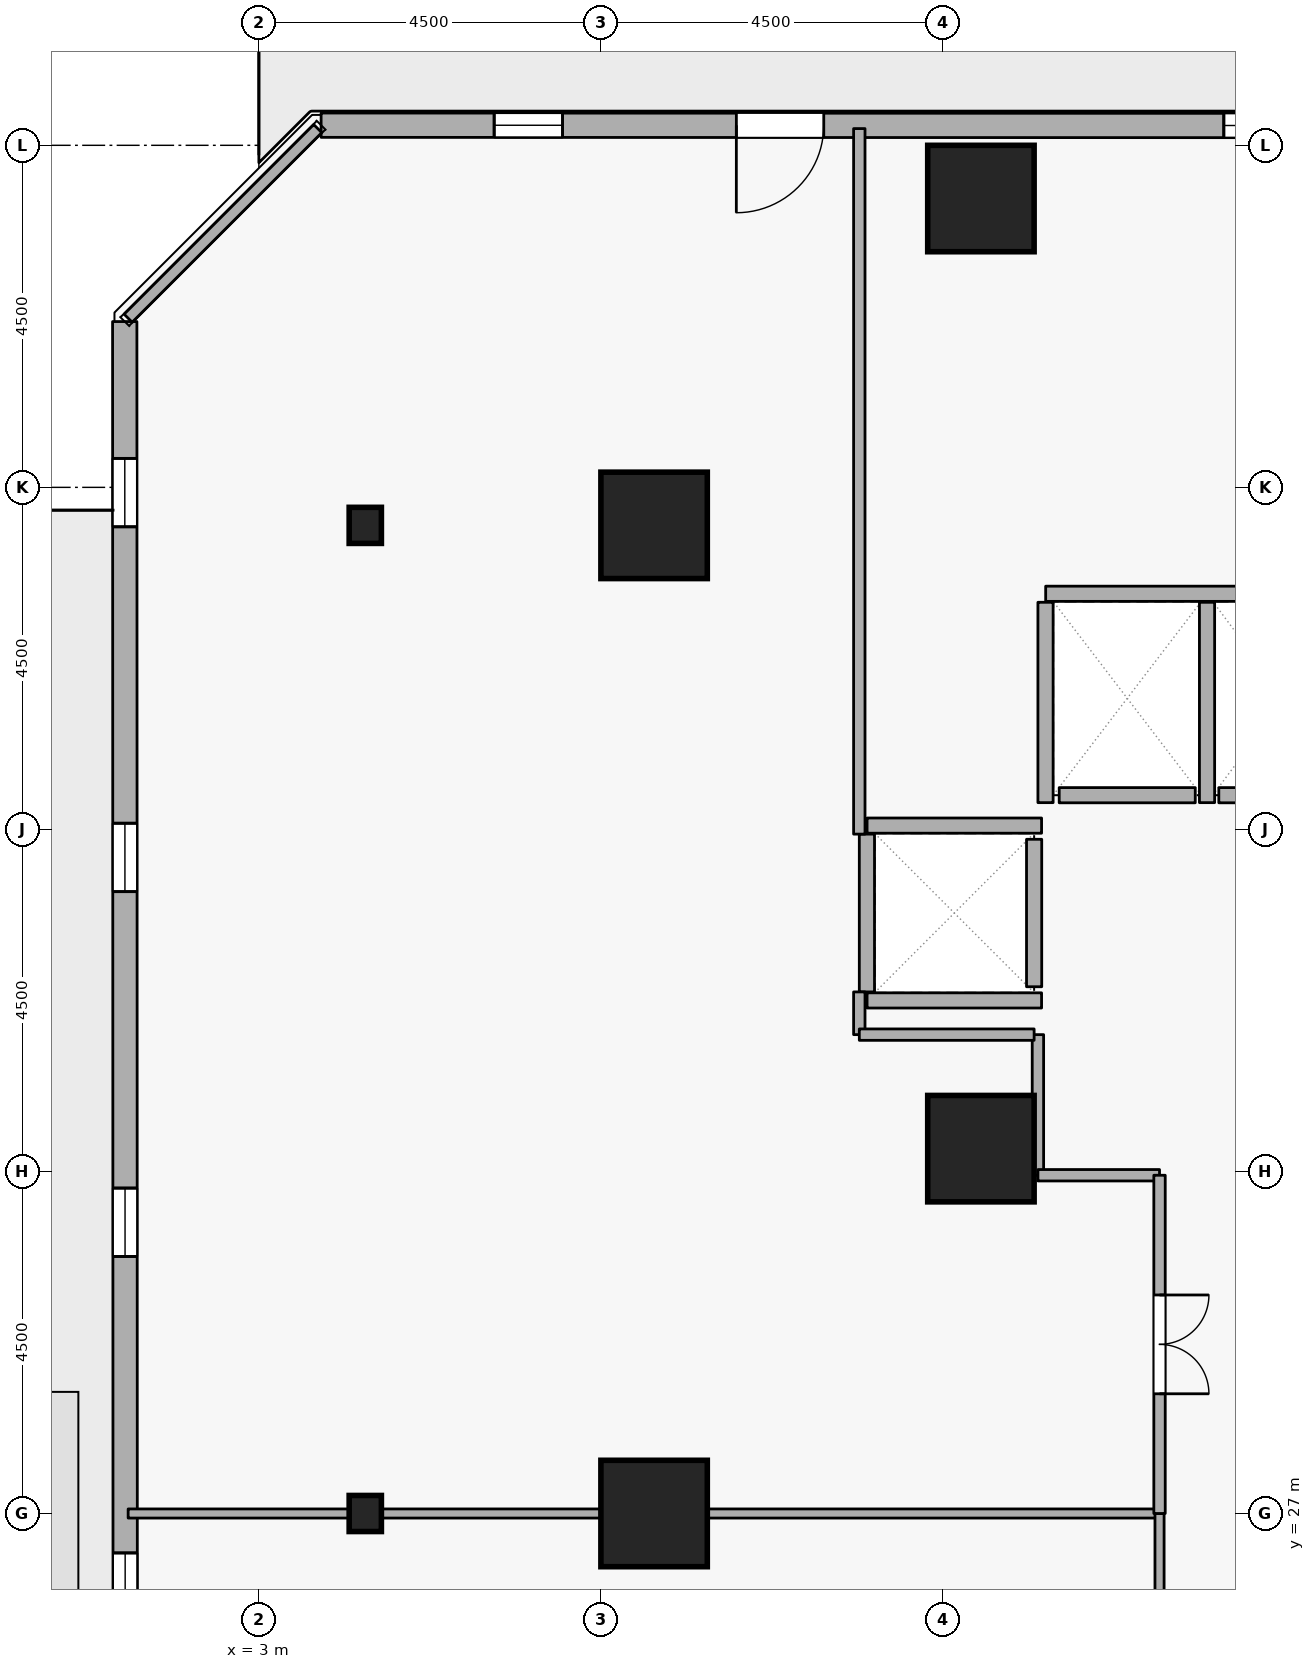
"""IFC4 building model, lengths in metres.
Left out: names, types, materials, properties, quantities, classifications, styles, units other than length and angle.
Written with IfcOpenShell. Run it as: python <this file> out.ifc"""

import sys

from ifc_helpers import new_model, si_unit, direction, frame, frame_2d, origin, origin_2d, place, context, subcontext, project, spatial, rectangle, i_section, extrude, element, fill, save


model = new_model("IFC4")
c1 = context("Model", 3, precision=1e-05, world=origin(), true_north=direction((0.0, 1.0)))
c2 = subcontext(c1, "Body", "Model", "MODEL_VIEW")
j1 = project(units=[si_unit("LENGTHUNIT", "METRE"), si_unit("PLANEANGLEUNIT", "RADIAN")], contexts=[c1])
p1 = place(None, origin())
s1 = spatial("IfcSite", under=j1, at=p1, CompositionType="ELEMENT")
p2 = place(p1, origin())
s2 = spatial("IfcBuilding", under=s1, at=p2, CompositionType="ELEMENT")
p3 = place(p2, frame((0.0, 0.0, 27.9)))
s3 = spatial("IfcBuildingStorey", under=s2, at=p3, CompositionType="ELEMENT", Elevation=27.9)
for number, where, z_axis, x_axis in (
    (1, (12.5, 44.3, 0.0), (0.0, 0.0, 1.0), (1.0, 0.0, 0.0)),
    (2, (8.2, 27.0, 0.0), (0.0, 0.0, 1.0), (1.0, 0.0, 0.0)),
    (3, (8.2, 40.0, 0.0), (0.0, 0.0, 1.0), (1.0, 0.0, 0.0)),
    (4, (12.5, 31.8, 0.0), (0.0, 0.0, 1.0), (1.0, 0.0, 0.0)),
):
    element("IfcColumn", number, at=place(p3, frame(where, z_axis=z_axis, x_axis=x_axis)), inside=s3, PredefinedType="COLUMN", context=c2, shape_type="SweptSolid", body=[
        extrude(rectangle(XDim=1.4, YDim=1.4, at=origin_2d()), origin(), (0.0, 0.0, 1.0), 3.6),
    ])
for number, where, z_axis, x_axis in (
    (5, (4.4, 27.0, 0.0), (0.0, 0.0, 1.0), (1.0, 0.0, 0.0)),
    (6, (4.4, 40.0, 0.0), (0.0, 0.0, 1.0), (1.0, 0.0, 0.0)),
):
    element("IfcColumn", number, at=place(p3, frame(where, z_axis=z_axis, x_axis=x_axis)), inside=s3, PredefinedType="COLUMN", context=c2, shape_type="SweptSolid", body=[
        extrude(i_section(OverallWidth=0.424, OverallDepth=0.475, WebThickness=0.048, FlangeThickness=0.077, FilletRadius=0.015, at=origin_2d()), origin(), (0.0, 0.0, 1.0), 3.6),
    ])
p4 = place(p3, frame((37.596, 45.253, 0.0), z_axis=(0.0, 0.0, 1.0), x_axis=(-0.999999942296, 0.000339718087, 0.0)))
e7 = element("IfcWall", 7, at=p4, inside=s3, PredefinedType="STANDARD", context=c2, shape_type="SweptSolid", body=[
    extrude(rectangle(XDim=33.777, YDim=0.32, at=frame_2d((16.888, 0.0))), origin(), (0.0, 0.0, 1.0), 2.7),
])
p5 = place(p4, frame((27.164, 0.0, 0.0)))
e8 = element("IfcOpeningElement", 8, at=p5, cuts=e7, PredefinedType="OPENING", context=c2, shape_type="SweptSolid", body=[
    extrude(rectangle(XDim=1.15, YDim=2.1, at=frame_2d((0.575, 1.05))), frame((0.0, 0.17, 0.0), z_axis=(0.0, -1.0, 0.0), x_axis=(1.0, 0.0, 0.0)), (0.0, 0.0, 1.0), 0.34),
])
p6 = place(p4, frame((6.6, 0.0, 0.72)))
e9 = element("IfcOpeningElement", 9, at=p6, cuts=e7, PredefinedType="OPENING", context=c2, shape_type="SweptSolid", body=[
    extrude(rectangle(XDim=0.9, YDim=1.75, at=frame_2d((0.45, 0.875))), frame((0.0, 0.17, 0.0), z_axis=(0.0, -1.0, 0.0), x_axis=(1.0, 0.0, 0.0)), (0.0, 0.0, 1.0), 0.34),
])
p7 = place(p4, frame((16.2, 0.0, 0.72)))
e10 = element("IfcOpeningElement", 10, at=p7, cuts=e7, PredefinedType="OPENING", context=c2, shape_type="SweptSolid", body=[
    extrude(rectangle(XDim=0.9, YDim=1.75, at=frame_2d((0.45, 0.875))), frame((0.0, 0.17, 0.0), z_axis=(0.0, -1.0, 0.0), x_axis=(1.0, 0.0, 0.0)), (0.0, 0.0, 1.0), 0.34),
])
p8 = place(p4, frame((21.0, 0.0, 0.72)))
e11 = element("IfcOpeningElement", 11, at=p8, cuts=e7, PredefinedType="OPENING", context=c2, shape_type="SweptSolid", body=[
    extrude(rectangle(XDim=0.9, YDim=1.75, at=frame_2d((0.45, 0.875))), frame((0.0, 0.17, 0.0), z_axis=(0.0, -1.0, 0.0), x_axis=(1.0, 0.0, 0.0)), (0.0, 0.0, 1.0), 0.34),
])
p9 = place(p4, frame((30.6, 0.0, 0.72)))
e12 = element("IfcOpeningElement", 12, at=p9, cuts=e7, PredefinedType="OPENING", context=c2, shape_type="SweptSolid", body=[
    extrude(rectangle(XDim=0.9, YDim=1.75, at=frame_2d((0.45, 0.875))), frame((0.0, 0.17, 0.0), z_axis=(0.0, -1.0, 0.0), x_axis=(1.0, 0.0, 0.0)), (0.0, 0.0, 1.0), 0.34),
])
p10 = place(p3, frame((1.235, 42.681, 0.0), z_axis=(0.0, 0.0, 1.0), x_axis=(0.000339718087, -0.999999942296, 0.0)))
e13 = element("IfcWall", 13, at=p10, inside=s3, PredefinedType="STANDARD", context=c2, shape_type="SweptSolid", body=[
    extrude(rectangle(XDim=33.777, YDim=0.32, at=frame_2d((16.888, 0.0))), origin(), (0.0, 0.0, 1.0), 2.7),
])
p11 = place(p10, frame((18.688, 0.0, 0.0)))
e14 = element("IfcOpeningElement", 14, at=p11, cuts=e13, PredefinedType="OPENING", context=c2, shape_type="SweptSolid", body=[
    extrude(rectangle(XDim=1.0, YDim=2.08, at=frame_2d((0.5, 1.04))), frame((0.0, 0.17, 0.0), z_axis=(0.0, -1.0, 0.0), x_axis=(1.0, 0.0, 0.0)), (0.0, 0.0, 1.0), 0.34),
])
p12 = place(p10, frame((1.8, 0.0, 0.72)))
e15 = element("IfcOpeningElement", 15, at=p12, cuts=e13, PredefinedType="OPENING", context=c2, shape_type="SweptSolid", body=[
    extrude(rectangle(XDim=0.9, YDim=1.75, at=frame_2d((0.45, 0.875))), frame((0.0, 0.17, 0.0), z_axis=(0.0, -1.0, 0.0), x_axis=(1.0, 0.0, 0.0)), (0.0, 0.0, 1.0), 0.34),
])
p13 = place(p10, frame((6.6, 0.0, 0.72)))
e16 = element("IfcOpeningElement", 16, at=p13, cuts=e13, PredefinedType="OPENING", context=c2, shape_type="SweptSolid", body=[
    extrude(rectangle(XDim=0.9, YDim=1.75, at=frame_2d((0.45, 0.875))), frame((0.0, 0.17, 0.0), z_axis=(0.0, -1.0, 0.0), x_axis=(1.0, 0.0, 0.0)), (0.0, 0.0, 1.0), 0.34),
])
p14 = place(p10, frame((11.4, 0.0, 0.72)))
e17 = element("IfcOpeningElement", 17, at=p14, cuts=e13, PredefinedType="OPENING", context=c2, shape_type="SweptSolid", body=[
    extrude(rectangle(XDim=0.9, YDim=1.75, at=frame_2d((0.45, 0.875))), frame((0.0, 0.17, 0.0), z_axis=(0.0, -1.0, 0.0), x_axis=(1.0, 0.0, 0.0)), (0.0, 0.0, 1.0), 0.34),
])
p15 = place(p10, frame((16.2, 0.0, 0.72)))
e18 = element("IfcOpeningElement", 18, at=p15, cuts=e13, PredefinedType="OPENING", context=c2, shape_type="SweptSolid", body=[
    extrude(rectangle(XDim=0.9, YDim=1.75, at=frame_2d((0.45, 0.875))), frame((0.0, 0.17, 0.0), z_axis=(0.0, -1.0, 0.0), x_axis=(1.0, 0.0, 0.0)), (0.0, 0.0, 1.0), 0.34),
])
p16 = place(p10, frame((21.0, 0.0, 0.72)))
e19 = element("IfcOpeningElement", 19, at=p16, cuts=e13, PredefinedType="OPENING", context=c2, shape_type="SweptSolid", body=[
    extrude(rectangle(XDim=0.9, YDim=1.75, at=frame_2d((0.45, 0.875))), frame((0.0, 0.17, 0.0), z_axis=(0.0, -1.0, 0.0), x_axis=(1.0, 0.0, 0.0)), (0.0, 0.0, 1.0), 0.34),
])
p17 = place(p10, frame((25.8, 0.0, 0.72)))
e20 = element("IfcOpeningElement", 20, at=p17, cuts=e13, PredefinedType="OPENING", context=c2, shape_type="SweptSolid", body=[
    extrude(rectangle(XDim=0.9, YDim=1.75, at=frame_2d((0.45, 0.875))), frame((0.0, 0.17, 0.0), z_axis=(0.0, -1.0, 0.0), x_axis=(1.0, 0.0, 0.0)), (0.0, 0.0, 1.0), 0.34),
])
p18 = place(p3, frame((17.37, 36.45, 0.0), z_axis=(0.0, 0.0, 1.0), x_axis=(-1.0, 0.0, 0.0)))
e21 = element("IfcWall", 21, at=p18, inside=s3, PredefinedType="STANDARD", context=c2, shape_type="SweptSolid", body=[
    extrude(rectangle(XDim=1.74, YDim=0.2, at=frame_2d((0.87, 0.0))), origin(), (0.0, 0.0, 1.0), 3.34),
])
p19 = place(p3, frame((15.32, 36.45, 0.0), z_axis=(0.0, 0.0, 1.0), x_axis=(-1.0, 0.0, 0.0)))
e22 = element("IfcWall", 22, at=p19, inside=s3, PredefinedType="STANDARD", context=c2, shape_type="SweptSolid", body=[
    extrude(rectangle(XDim=1.79, YDim=0.2, at=frame_2d((0.895, 0.0))), origin(), (0.0, 0.0, 1.0), 3.34),
])
p20 = place(p3, frame((13.2, 33.93, 0.0), z_axis=(0.0, 0.0, 1.0), x_axis=(0.0, 1.0, 0.0)))
e23 = element("IfcWall", 23, at=p20, inside=s3, PredefinedType="STANDARD", context=c2, shape_type="SweptSolid", body=[
    extrude(rectangle(XDim=1.94, YDim=0.2, at=frame_2d((0.97, 0.0))), origin(), (0.0, 0.0, 1.0), 3.34),
])
p21 = place(p3, frame((13.352, 39.1, 0.0), z_axis=(0.0, 0.0, 1.0), x_axis=(1.0, 0.0, 0.0)))
e24 = element("IfcWall", 24, at=p21, inside=s3, PredefinedType="STANDARD", context=c2, shape_type="SweptSolid", body=[
    extrude(rectangle(XDim=4.196, YDim=0.2, at=frame_2d((2.098, 0.0))), origin(), (0.0, 0.0, 1.0), 3.34),
])
for number, where, z_axis, x_axis in (
    (25, (15.475, 36.352, 0.0), (0.0, 0.0, 1.0), (0.0, 1.0, 0.0)),
    (26, (13.35, 36.352, 0.0), (0.0, 0.0, 1.0), (0.0, 1.0, 0.0)),
):
    element("IfcWall", number, at=place(p3, frame(where, z_axis=z_axis, x_axis=x_axis)), inside=s3, PredefinedType="STANDARD", context=c2, shape_type="SweptSolid", body=[
        extrude(rectangle(XDim=2.636, YDim=0.2, at=frame_2d((1.318, 0.0))), origin(), (0.0, 0.0, 1.0), 3.34),
    ])
for number, where, z_axis, x_axis in (
    (27, (11.002, 36.05, 0.0), (0.0, 0.0, 1.0), (1.0, 0.0, 0.0)),
    (28, (11.002, 33.75, 0.0), (0.0, 0.0, 1.0), (1.0, 0.0, 0.0)),
):
    element("IfcWall", number, at=place(p3, frame(where, z_axis=z_axis, x_axis=x_axis)), inside=s3, PredefinedType="STANDARD", context=c2, shape_type="SweptSolid", body=[
        extrude(rectangle(XDim=2.296, YDim=0.2, at=frame_2d((1.148, 0.0))), origin(), (0.0, 0.0, 1.0), 3.34),
    ])
p22 = place(p3, frame((11.0, 33.862, 0.0), z_axis=(0.0, 0.0, 1.0), x_axis=(0.0, 1.0, 0.0)))
e29 = element("IfcWall", 29, at=p22, inside=s3, PredefinedType="STANDARD", context=c2, shape_type="SweptSolid", body=[
    extrude(rectangle(XDim=2.076, YDim=0.2, at=frame_2d((1.038, 0.0))), origin(), (0.0, 0.0, 1.0), 3.34),
])
p23 = place(p3, frame((1.28, 27.0, 0.0), z_axis=(0.0, 0.0, 1.0), x_axis=(1.0, 0.0, 0.0)))
e30 = element("IfcWall", 30, at=p23, inside=s3, PredefinedType="PARTITIONING", context=c2, shape_type="SweptSolid", body=[
    extrude(rectangle(XDim=13.57, YDim=0.12, at=frame_2d((6.785, 0.0))), origin(), (0.0, 0.0, 1.0), 2.878),
])
p24 = place(p3, frame((14.85, 27.0, 0.0), z_axis=(0.0, 0.0, 1.0), x_axis=(0.0, -1.0, 0.0)))
e31 = element("IfcWall", 31, at=p24, inside=s3, PredefinedType="PARTITIONING", context=c2, shape_type="SweptSolid", body=[
    extrude(rectangle(XDim=4.45, YDim=0.12, at=frame_2d((2.225, 0.0))), origin(), (0.0, 0.0, 1.0), 3.34),
])
p25 = place(p3, frame((13.25, 33.3, 0.0), z_axis=(0.0, 0.0, 1.0), x_axis=(0.0, -1.0, 0.0)))
e32 = element("IfcWall", 32, at=p25, inside=s3, PredefinedType="PARTITIONING", context=c2, shape_type="SweptSolid", body=[
    extrude(rectangle(XDim=1.85, YDim=0.15, at=frame_2d((0.925, 0.0))), origin(), (0.0, 0.0, 1.0), 3.34),
])
p26 = place(p3, frame((13.25, 31.45, 0.0), z_axis=(0.0, 0.0, 1.0), x_axis=(1.0, 0.0, 0.0)))
e33 = element("IfcWall", 33, at=p26, inside=s3, PredefinedType="PARTITIONING", context=c2, shape_type="SweptSolid", body=[
    extrude(rectangle(XDim=1.6, YDim=0.15, at=frame_2d((0.8, 0.0))), origin(), (0.0, 0.0, 1.0), 3.34),
])
p27 = place(p3, frame((14.85, 31.45, 0.0), z_axis=(0.0, 0.0, 1.0), x_axis=(0.0, -1.0, 0.0)))
e34 = element("IfcWall", 34, at=p27, inside=s3, PredefinedType="PARTITIONING", context=c2, shape_type="SweptSolid", body=[
    extrude(rectangle(XDim=4.45, YDim=0.15, at=frame_2d((2.225, 0.0))), origin(), (0.0, 0.0, 1.0), 3.34),
])
p28 = place(p27, frame((1.575, 0.0, 0.0)))
e35 = element("IfcOpeningElement", 35, at=p28, cuts=e34, PredefinedType="OPENING", context=c2, shape_type="SweptSolid", body=[
    extrude(rectangle(XDim=1.3, YDim=2.12, at=frame_2d((0.65, 1.06))), frame((0.0, 0.085, 0.0), z_axis=(0.0, -1.0, 0.0), x_axis=(1.0, 0.0, 0.0)), (0.0, 0.0, 1.0), 0.17),
])
p29 = place(p3, frame((1.28, 42.725, 0.0), z_axis=(0.0, 0.0, 1.0), x_axis=(0.707106781187, 0.707106781187, 0.0)))
e36 = element("IfcWall", 36, at=p29, inside=s3, PredefinedType="PARTITIONING", context=c2, shape_type="SweptSolid", body=[
    extrude(rectangle(XDim=3.528, YDim=0.15, at=frame_2d((1.764, 0.0))), origin(), (0.0, 0.0, 1.0), 3.34),
])
p30 = place(p3, frame((10.9, 45.22, 0.0), z_axis=(0.0, 0.0, 1.0), x_axis=(0.0, -1.0, 0.0)))
e37 = element("IfcWall", 37, at=p30, inside=s3, PredefinedType="PARTITIONING", context=c2, shape_type="SweptSolid", body=[
    extrude(rectangle(XDim=9.282, YDim=0.15, at=frame_2d((4.641, 0.0))), origin(), (0.0, 0.0, 1.0), 3.34),
])
p31 = place(p3, frame((10.9, 33.862, 0.0), z_axis=(0.0, 0.0, 1.0), x_axis=(0.0, -1.0, 0.0)))
e38 = element("IfcWall", 38, at=p31, inside=s3, PredefinedType="PARTITIONING", context=c2, shape_type="SweptSolid", body=[
    extrude(rectangle(XDim=0.562, YDim=0.15, at=frame_2d((0.281, 0.0))), origin(), (0.0, 0.0, 1.0), 3.34),
])
p32 = place(p3, frame((10.9, 33.3, 0.0), z_axis=(0.0, 0.0, 1.0), x_axis=(1.0, 0.0, 0.0)))
e39 = element("IfcWall", 39, at=p32, inside=s3, PredefinedType="PARTITIONING", context=c2, shape_type="SweptSolid", body=[
    extrude(rectangle(XDim=2.3, YDim=0.15, at=frame_2d((1.15, 0.0))), origin(), (0.0, 0.0, 1.0), 3.34),
])
p33 = place(p5, origin())
e40 = element("IfcDoor", 40, at=p33, inside=s3, OperationType="SINGLE_SWING_RIGHT", PredefinedType="DOOR", context=c2, shape_type="SweptSolid", body=[
    extrude(rectangle(XDim=1.15, YDim=2.1, at=frame_2d((0.575, 1.05))), frame((0.0, 0.025, 0.0), z_axis=(0.0, -1.0, 0.0), x_axis=(1.0, 0.0, 0.0)), (0.0, 0.0, 1.0), 0.05),
])
fill(e8, e40)
p34 = place(p8, origin())
e41 = element("IfcWindow", 41, at=p34, inside=s3, PartitioningType="SINGLE_PANEL", PredefinedType="WINDOW", context=c2, shape_type="SweptSolid", body=[
    extrude(rectangle(XDim=0.9, YDim=1.75, at=frame_2d((0.45, 0.875))), frame((0.0, 0.03, 0.0), z_axis=(0.0, -1.0, 0.0), x_axis=(1.0, 0.0, 0.0)), (0.0, 0.0, 1.0), 0.06),
])
fill(e11, e41)
p35 = place(p9, origin())
e42 = element("IfcWindow", 42, at=p35, inside=s3, PartitioningType="SINGLE_PANEL", PredefinedType="WINDOW", context=c2, shape_type="SweptSolid", body=[
    extrude(rectangle(XDim=0.9, YDim=1.75, at=frame_2d((0.45, 0.875))), frame((0.0, 0.03, 0.0), z_axis=(0.0, -1.0, 0.0), x_axis=(1.0, 0.0, 0.0)), (0.0, 0.0, 1.0), 0.06),
])
fill(e12, e42)
p36 = place(p12, origin())
e43 = element("IfcWindow", 43, at=p36, inside=s3, PartitioningType="SINGLE_PANEL", PredefinedType="WINDOW", context=c2, shape_type="SweptSolid", body=[
    extrude(rectangle(XDim=0.9, YDim=1.75, at=frame_2d((0.45, 0.875))), frame((0.0, 0.03, 0.0), z_axis=(0.0, -1.0, 0.0), x_axis=(1.0, 0.0, 0.0)), (0.0, 0.0, 1.0), 0.06),
])
fill(e15, e43)
p37 = place(p13, origin())
e44 = element("IfcWindow", 44, at=p37, inside=s3, PartitioningType="SINGLE_PANEL", PredefinedType="WINDOW", context=c2, shape_type="SweptSolid", body=[
    extrude(rectangle(XDim=0.9, YDim=1.75, at=frame_2d((0.45, 0.875))), frame((0.0, 0.03, 0.0), z_axis=(0.0, -1.0, 0.0), x_axis=(1.0, 0.0, 0.0)), (0.0, 0.0, 1.0), 0.06),
])
fill(e16, e44)
p38 = place(p14, origin())
e45 = element("IfcWindow", 45, at=p38, inside=s3, PartitioningType="SINGLE_PANEL", PredefinedType="WINDOW", context=c2, shape_type="SweptSolid", body=[
    extrude(rectangle(XDim=0.9, YDim=1.75, at=frame_2d((0.45, 0.875))), frame((0.0, 0.03, 0.0), z_axis=(0.0, -1.0, 0.0), x_axis=(1.0, 0.0, 0.0)), (0.0, 0.0, 1.0), 0.06),
])
fill(e17, e45)
p39 = place(p15, origin())
e46 = element("IfcWindow", 46, at=p39, inside=s3, PartitioningType="SINGLE_PANEL", PredefinedType="WINDOW", context=c2, shape_type="SweptSolid", body=[
    extrude(rectangle(XDim=0.9, YDim=1.75, at=frame_2d((0.45, 0.875))), frame((0.0, 0.03, 0.0), z_axis=(0.0, -1.0, 0.0), x_axis=(1.0, 0.0, 0.0)), (0.0, 0.0, 1.0), 0.06),
])
fill(e18, e46)
p40 = place(p28, origin())
e47 = element("IfcDoor", 47, at=p40, inside=s3, OperationType="DOUBLE_DOOR_SINGLE_SWING", PredefinedType="DOOR", context=c2, shape_type="SweptSolid", body=[
    extrude(rectangle(XDim=1.3, YDim=2.12, at=frame_2d((0.65, 1.06))), frame((0.0, 0.025, 0.0), z_axis=(0.0, -1.0, 0.0), x_axis=(1.0, 0.0, 0.0)), (0.0, 0.0, 1.0), 0.05),
])
fill(e35, e47)
save(model, sys.argv[1])
